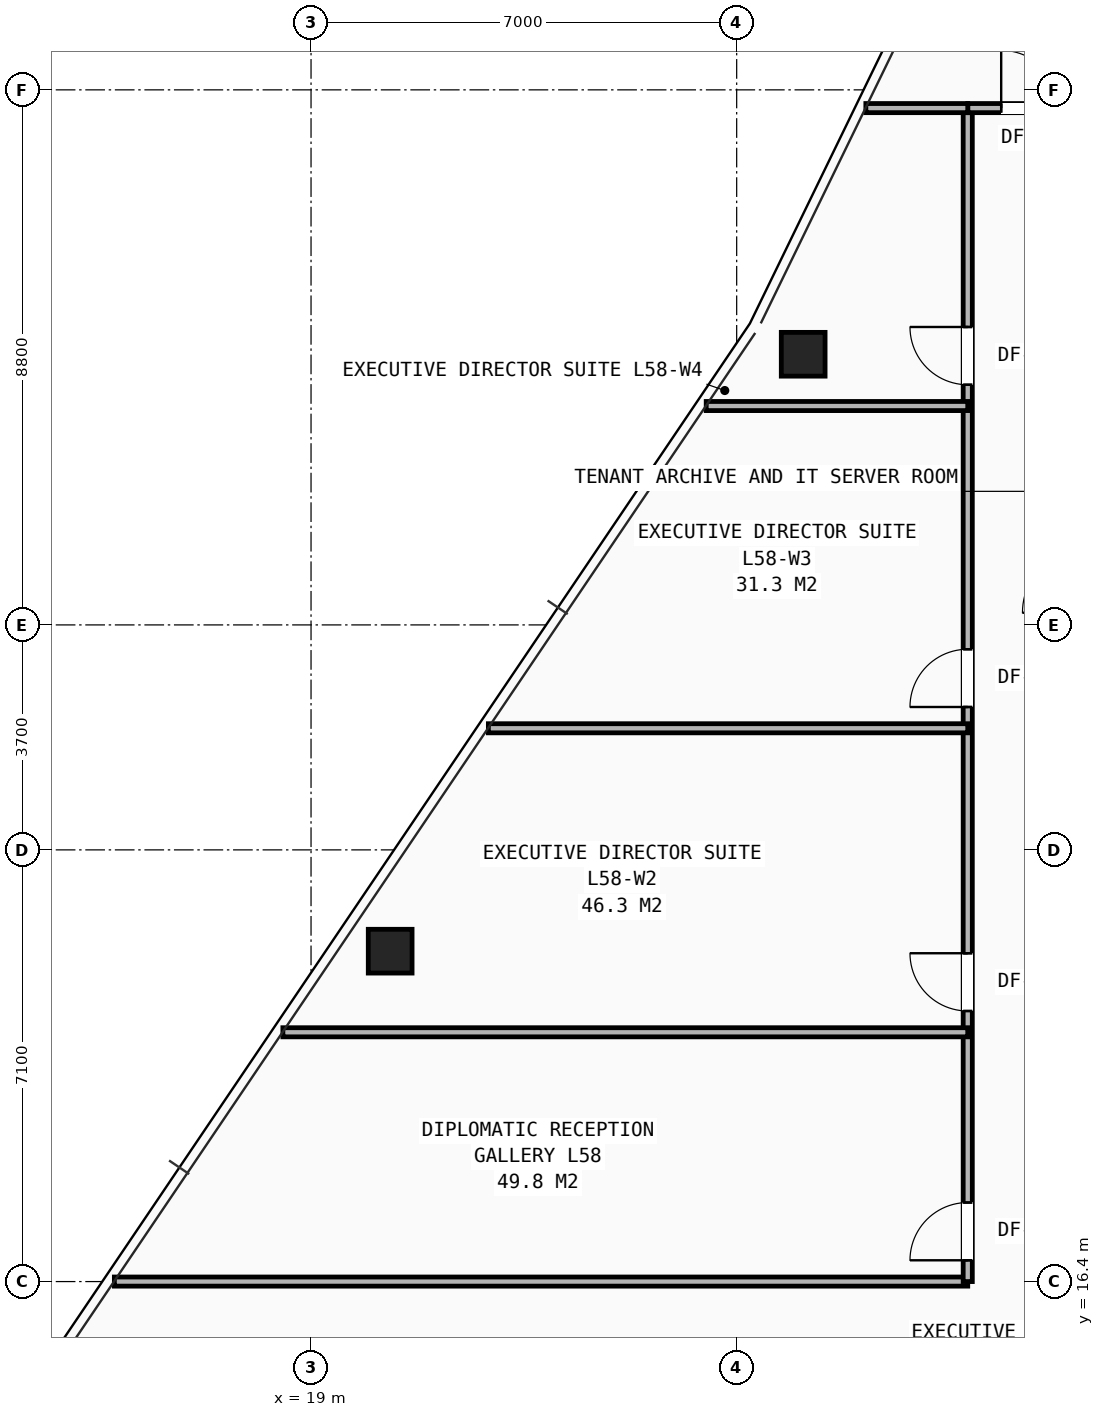
"""IFC4 building model, lengths in metres.
Left out: names, types, materials, properties, quantities, classifications, styles, units other than length and angle.
Written with IfcOpenShell. Run it as: python <this file> out.ifc"""

import sys

from ifc_helpers import new_model, si_unit, direction, frame, frame_2d, origin, origin_2d, place, context, subcontext, project, spatial, rectangle, hollow_rectangle, extrude, element, fill, save


model = new_model("IFC4")
c1 = context("Model", 3, precision=1e-05, world=origin(), true_north=direction((0.0, 1.0)))
c2 = subcontext(c1, "Body", "Model", "MODEL_VIEW")
j1 = project(units=[si_unit("LENGTHUNIT", "METRE"), si_unit("PLANEANGLEUNIT", "RADIAN")], contexts=[c1])
p1 = place(None, origin())
s1 = spatial("IfcSite", under=j1, at=p1, CompositionType="ELEMENT")
p2 = place(p1, origin())
s2 = spatial("IfcBuilding", under=s1, at=p2, CompositionType="ELEMENT")
p3 = place(p2, frame((0.0, 0.0, 204.9)))
s3 = spatial("IfcBuildingStorey", under=s2, at=p3, CompositionType="ELEMENT", Elevation=204.9)
for number, where, z_axis, x_axis in (
    (1, (27.094, 31.652, 0.0), (0.0, 0.0, 1.0), (1.0, 0.0, 0.0)),
    (2, (20.302, 21.834, 0.0), (0.0, 0.0, 1.0), (1.0, 0.0, 0.0)),
):
    element("IfcColumn", number, at=place(p3, frame(where, z_axis=z_axis, x_axis=x_axis)), inside=s3, PredefinedType="COLUMN", context=c2, shape_type="SweptSolid", body=[
        extrude(hollow_rectangle(XDim=0.72, YDim=0.72, WallThickness=0.05, at=origin_2d()), origin(), (0.0, 0.0, 1.0), 3.5),
    ])
p4 = place(p3, frame((15.766, 16.4, 0.0), z_axis=(0.0, 0.0, 1.0), x_axis=(1.0, 0.0, 0.0)))
e3 = element("IfcWall", 3, at=p4, inside=s3, PredefinedType="PARTITIONING", context=c2, shape_type="SweptSolid", body=[
    extrude(rectangle(XDim=14.034, YDim=0.15, at=frame_2d((7.017, 0.0))), origin(), (0.0, 0.0, 1.0), 2.292),
])
p5 = place(p3, frame((29.8, 16.4, 0.0), z_axis=(0.0, 0.0, 1.0), x_axis=(0.0, 1.0, 0.0)))
e4 = element("IfcWall", 4, at=p5, inside=s3, PredefinedType="PARTITIONING", context=c2, shape_type="SweptSolid", body=[
    extrude(rectangle(XDim=19.3, YDim=0.15, at=frame_2d((9.65, 0.0))), origin(), (0.0, 0.0, 1.0), 2.292),
])
p6 = place(p5, frame((0.35, 0.0, 0.0)))
e5 = element("IfcOpeningElement", 5, at=p6, cuts=e4, PredefinedType="OPENING", context=c2, shape_type="SweptSolid", body=[
    extrude(rectangle(XDim=0.95, YDim=2.1, at=frame_2d((0.475, 1.05))), frame((0.0, 0.085, 0.0), z_axis=(0.0, -1.0, 0.0), x_axis=(1.0, 0.0, 0.0)), (0.0, 0.0, 1.0), 0.17),
])
p7 = place(p5, frame((4.45, 0.0, 0.0)))
e6 = element("IfcOpeningElement", 6, at=p7, cuts=e4, PredefinedType="OPENING", context=c2, shape_type="SweptSolid", body=[
    extrude(rectangle(XDim=0.95, YDim=2.1, at=frame_2d((0.475, 1.05))), frame((0.0, 0.085, 0.0), z_axis=(0.0, -1.0, 0.0), x_axis=(1.0, 0.0, 0.0)), (0.0, 0.0, 1.0), 0.17),
])
p8 = place(p5, frame((9.45, 0.0, 0.0)))
e7 = element("IfcOpeningElement", 7, at=p8, cuts=e4, PredefinedType="OPENING", context=c2, shape_type="SweptSolid", body=[
    extrude(rectangle(XDim=0.95, YDim=2.1, at=frame_2d((0.475, 1.05))), frame((0.0, 0.085, 0.0), z_axis=(0.0, -1.0, 0.0), x_axis=(1.0, 0.0, 0.0)), (0.0, 0.0, 1.0), 0.17),
])
p9 = place(p5, frame((14.75, 0.0, 0.0)))
e8 = element("IfcOpeningElement", 8, at=p9, cuts=e4, PredefinedType="OPENING", context=c2, shape_type="SweptSolid", body=[
    extrude(rectangle(XDim=0.95, YDim=2.1, at=frame_2d((0.475, 1.05))), frame((0.0, 0.085, 0.0), z_axis=(0.0, -1.0, 0.0), x_axis=(1.0, 0.0, 0.0)), (0.0, 0.0, 1.0), 0.17),
])
p10 = place(p3, frame((29.8, 35.7, 0.0), z_axis=(0.0, 0.0, 1.0), x_axis=(1.0, 0.0, 0.0)))
e9 = element("IfcWall", 9, at=p10, inside=s3, PredefinedType="PARTITIONING", context=c2, shape_type="SweptSolid", body=[
    extrude(rectangle(XDim=9.45, YDim=0.15, at=frame_2d((4.725, 0.0))), origin(), (0.0, 0.0, 1.0), 2.833),
])
p11 = place(p10, frame((0.55, 0.0, 0.0)))
e10 = element("IfcOpeningElement", 10, at=p11, cuts=e9, PredefinedType="OPENING", context=c2, shape_type="SweptSolid", body=[
    extrude(rectangle(XDim=0.95, YDim=2.1, at=frame_2d((0.475, 1.05))), frame((0.0, 0.085, 0.0), z_axis=(0.0, -1.0, 0.0), x_axis=(1.0, 0.0, 0.0)), (0.0, 0.0, 1.0), 0.17),
])
p12 = place(p10, frame((6.05, 0.0, 0.0)))
e11 = element("IfcOpeningElement", 11, at=p12, cuts=e9, PredefinedType="OPENING", context=c2, shape_type="SweptSolid", body=[
    extrude(rectangle(XDim=0.95, YDim=2.1, at=frame_2d((0.475, 1.05))), frame((0.0, 0.085, 0.0), z_axis=(0.0, -1.0, 0.0), x_axis=(1.0, 0.0, 0.0)), (0.0, 0.0, 1.0), 0.17),
])
p13 = place(p3, frame((28.124, 35.7, 0.0), z_axis=(0.0, 0.0, 1.0), x_axis=(1.0, 0.0, 0.0)))
e12 = element("IfcWall", 12, at=p13, inside=s3, PredefinedType="PARTITIONING", context=c2, shape_type="SweptSolid", body=[
    extrude(rectangle(XDim=1.676, YDim=0.15, at=frame_2d((0.838, 0.0))), origin(), (0.0, 0.0, 1.0), 2.628),
])
p14 = place(p3, frame((18.537, 20.5, 0.0), z_axis=(0.0, 0.0, 1.0), x_axis=(1.0, 0.0, 0.0)))
e13 = element("IfcWall", 13, at=p14, inside=s3, PredefinedType="PARTITIONING", context=c2, shape_type="SweptSolid", body=[
    extrude(rectangle(XDim=11.263, YDim=0.15, at=frame_2d((5.632, 0.0))), origin(), (0.0, 0.0, 1.0), 2.292),
])
p15 = place(p3, frame((21.917, 25.5, 0.0), z_axis=(0.0, 0.0, 1.0), x_axis=(1.0, 0.0, 0.0)))
e14 = element("IfcWall", 14, at=p15, inside=s3, PredefinedType="PARTITIONING", context=c2, shape_type="SweptSolid", body=[
    extrude(rectangle(XDim=7.884, YDim=0.15, at=frame_2d((3.942, 0.0))), origin(), (0.0, 0.0, 1.0), 2.628),
])
p16 = place(p3, frame((25.499, 30.8, 0.0), z_axis=(0.0, 0.0, 1.0), x_axis=(1.0, 0.0, 0.0)))
e15 = element("IfcWall", 15, at=p16, inside=s3, PredefinedType="PARTITIONING", context=c2, shape_type="SweptSolid", body=[
    extrude(rectangle(XDim=4.301, YDim=0.15, at=frame_2d((2.151, 0.0))), origin(), (0.0, 0.0, 1.0), 2.628),
])
p17 = place(p6, origin())
e16 = element("IfcDoor", 16, at=p17, inside=s3, OperationType="SINGLE_SWING_LEFT", PredefinedType="DOOR", context=c2, shape_type="SweptSolid", body=[
    extrude(rectangle(XDim=0.95, YDim=2.1, at=frame_2d((0.475, 1.05))), frame((0.0, 0.025, 0.0), z_axis=(0.0, -1.0, 0.0), x_axis=(1.0, 0.0, 0.0)), (0.0, 0.0, 1.0), 0.05),
])
fill(e5, e16)
p18 = place(p7, origin())
e17 = element("IfcDoor", 17, at=p18, inside=s3, OperationType="SINGLE_SWING_RIGHT", PredefinedType="DOOR", context=c2, shape_type="SweptSolid", body=[
    extrude(rectangle(XDim=0.95, YDim=2.1, at=frame_2d((0.475, 1.05))), frame((0.0, 0.025, 0.0), z_axis=(0.0, -1.0, 0.0), x_axis=(1.0, 0.0, 0.0)), (0.0, 0.0, 1.0), 0.05),
])
fill(e6, e17)
p19 = place(p8, origin())
e18 = element("IfcDoor", 18, at=p19, inside=s3, OperationType="SINGLE_SWING_LEFT", PredefinedType="DOOR", context=c2, shape_type="SweptSolid", body=[
    extrude(rectangle(XDim=0.95, YDim=2.1, at=frame_2d((0.475, 1.05))), frame((0.0, 0.025, 0.0), z_axis=(0.0, -1.0, 0.0), x_axis=(1.0, 0.0, 0.0)), (0.0, 0.0, 1.0), 0.05),
])
fill(e7, e18)
p20 = place(p9, origin())
e19 = element("IfcDoor", 19, at=p20, inside=s3, OperationType="SINGLE_SWING_RIGHT", PredefinedType="DOOR", context=c2, shape_type="SweptSolid", body=[
    extrude(rectangle(XDim=0.95, YDim=2.1, at=frame_2d((0.475, 1.05))), frame((0.0, 0.025, 0.0), z_axis=(0.0, -1.0, 0.0), x_axis=(1.0, 0.0, 0.0)), (0.0, 0.0, 1.0), 0.05),
])
fill(e8, e19)
p21 = place(p11, origin())
e20 = element("IfcDoor", 20, at=p21, inside=s3, OperationType="SINGLE_SWING_LEFT", PredefinedType="DOOR", context=c2, shape_type="SweptSolid", body=[
    extrude(rectangle(XDim=0.95, YDim=2.1, at=frame_2d((0.475, 1.05))), frame((0.0, 0.025, 0.0), z_axis=(0.0, -1.0, 0.0), x_axis=(1.0, 0.0, 0.0)), (0.0, 0.0, 1.0), 0.05),
])
fill(e10, e20)
save(model, sys.argv[1])
